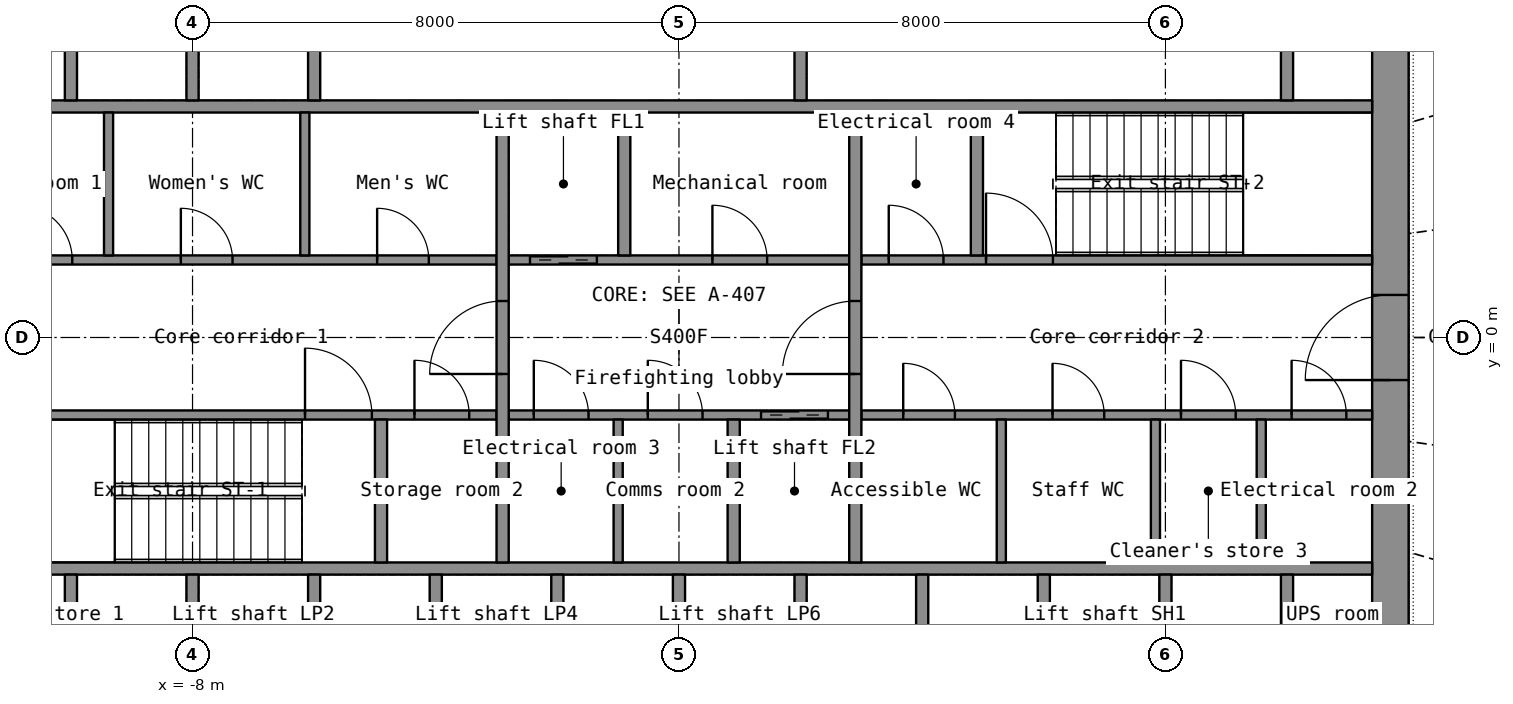
"""IFC4 building model, lengths in metres.
Left out: names, types, materials, properties, quantities, classifications, styles, units other than length and angle.
Written with IfcOpenShell. Run it as: python <this file> out.ifc"""

import sys

from ifc_helpers import new_model, si_unit, direction, frame, frame_2d, origin, place, context, subcontext, project, spatial, rectangle, extrude, element, fill, save


model = new_model("IFC4")
c1 = context("Model", 3, precision=1e-05, world=origin(), true_north=direction((0.0, 1.0)))
c2 = subcontext(c1, "Body", "Model", "MODEL_VIEW")
j1 = project(units=[si_unit("LENGTHUNIT", "METRE"), si_unit("PLANEANGLEUNIT", "RADIAN")], contexts=[c1])
p1 = place(None, origin())
s1 = spatial("IfcSite", under=j1, at=p1, CompositionType="ELEMENT")
p2 = place(p1, origin())
s2 = spatial("IfcBuilding", under=s1, at=p2, CompositionType="ELEMENT")
p3 = place(p2, frame((0.0, 0.0, 28.7)))
s3 = spatial("IfcBuildingStorey", under=s2, at=p3, CompositionType="ELEMENT", Elevation=28.7)
p4 = place(p3, frame((11.7, -7.2, 0.0), z_axis=(0.0, 0.0, 1.0), x_axis=(0.0, 1.0, 0.0)))
e1 = element("IfcWall", 1, at=p4, inside=s3, PredefinedType="SHEAR", context=c2, shape_type="SweptSolid", body=[
    extrude(rectangle(XDim=14.4, YDim=0.6, at=frame_2d((7.2, 0.0))), origin(), (0.0, 0.0, 1.0), 3.8),
])
p5 = place(p4, frame((6.5, 0.0, 0.0)))
e2 = element("IfcOpeningElement", 2, at=p5, cuts=e1, PredefinedType="OPENING", context=c2, shape_type="SweptSolid", body=[
    extrude(rectangle(XDim=1.4, YDim=2.2, at=frame_2d((0.7, 1.1))), frame((0.0, 0.31, 0.0), z_axis=(0.0, -1.0, 0.0), x_axis=(1.0, 0.0, 0.0)), (0.0, 0.0, 1.0), 0.62),
])
for number, where, z_axis, x_axis in (
    (3, (-11.4, -3.8, 0.0), (0.0, 0.0, 1.0), (1.0, 0.0, 0.0)),
    (4, (-11.4, 3.8, 0.0), (0.0, 0.0, 1.0), (1.0, 0.0, 0.0)),
):
    element("IfcWall", number, at=place(p3, frame(where, z_axis=z_axis, x_axis=x_axis)), inside=s3, PredefinedType="SHEAR", context=c2, shape_type="SweptSolid", body=[
        extrude(rectangle(XDim=22.8, YDim=0.2, at=frame_2d((11.4, 0.0))), origin(), (0.0, 0.0, 1.0), 3.8),
    ])
for number, where, z_axis, x_axis in (
    (5, (-10.0, -6.6, 0.0), (0.0, 0.0, 1.0), (0.0, 1.0, 0.0)),
    (6, (-8.0, -6.6, 0.0), (0.0, 0.0, 1.0), (0.0, 1.0, 0.0)),
    (7, (-6.0, -6.6, 0.0), (0.0, 0.0, 1.0), (0.0, 1.0, 0.0)),
    (8, (-4.0, -6.6, 0.0), (0.0, 0.0, 1.0), (0.0, 1.0, 0.0)),
    (9, (-2.0, -6.6, 0.0), (0.0, 0.0, 1.0), (0.0, 1.0, 0.0)),
    (10, (0.0, -6.6, 0.0), (0.0, 0.0, 1.0), (0.0, 1.0, 0.0)),
    (11, (2.0, -6.6, 0.0), (0.0, 0.0, 1.0), (0.0, 1.0, 0.0)),
    (12, (4.0, -6.6, 0.0), (0.0, 0.0, 1.0), (0.0, 1.0, 0.0)),
    (13, (6.0, -6.6, 0.0), (0.0, 0.0, 1.0), (0.0, 1.0, 0.0)),
    (14, (8.0, -6.6, 0.0), (0.0, 0.0, 1.0), (0.0, 1.0, 0.0)),
    (15, (10.0, -6.6, 0.0), (0.0, 0.0, 1.0), (0.0, 1.0, 0.0)),
    (16, (-10.0, 3.9, 0.0), (0.0, 0.0, 1.0), (0.0, 1.0, 0.0)),
    (17, (-8.0, 3.9, 0.0), (0.0, 0.0, 1.0), (0.0, 1.0, 0.0)),
    (18, (-6.0, 3.9, 0.0), (0.0, 0.0, 1.0), (0.0, 1.0, 0.0)),
    (19, (10.0, 3.9, 0.0), (0.0, 0.0, 1.0), (0.0, 1.0, 0.0)),
):
    element("IfcWall", number, at=place(p3, frame(where, z_axis=z_axis, x_axis=x_axis)), inside=s3, PredefinedType="SHEAR", context=c2, shape_type="SweptSolid", body=[
        extrude(rectangle(XDim=2.7, YDim=0.2, at=frame_2d((1.35, 0.0))), origin(), (0.0, 0.0, 1.0), 3.8),
    ])
p6 = place(p3, frame((2.0, 3.9, 0.0), z_axis=(0.0, 0.0, 1.0), x_axis=(0.0, 1.0, 0.0)))
e20 = element("IfcWall", 20, at=p6, inside=s3, PredefinedType="PARTITIONING", context=c2, shape_type="SweptSolid", body=[
    extrude(rectangle(XDim=2.7, YDim=0.2, at=frame_2d((1.35, 0.0))), origin(), (0.0, 0.0, 1.0), 3.8),
])
p7 = place(p3, frame((-11.4, -1.275, 0.0), z_axis=(0.0, 0.0, 1.0), x_axis=(1.0, 0.0, 0.0)))
e21 = element("IfcWall", 21, at=p7, inside=s3, PredefinedType="SHEAR", context=c2, shape_type="SweptSolid", body=[
    extrude(rectangle(XDim=8.4, YDim=0.15, at=frame_2d((4.2, 0.0))), origin(), (0.0, 0.0, 1.0), 3.8),
])
p8 = place(p7, frame((5.25, 0.0, 0.0)))
e22 = element("IfcOpeningElement", 22, at=p8, cuts=e21, PredefinedType="OPENING", context=c2, shape_type="SweptSolid", body=[
    extrude(rectangle(XDim=1.1, YDim=2.15, at=frame_2d((0.55, 1.075))), frame((0.0, 0.085, 0.0), z_axis=(0.0, -1.0, 0.0), x_axis=(1.0, 0.0, 0.0)), (0.0, 0.0, 1.0), 0.17),
])
p9 = place(p7, frame((7.05, 0.0, 0.0)))
e23 = element("IfcOpeningElement", 23, at=p9, cuts=e21, PredefinedType="OPENING", context=c2, shape_type="SweptSolid", body=[
    extrude(rectangle(XDim=0.9, YDim=2.1, at=frame_2d((0.45, 1.05))), frame((0.0, 0.085, 0.0), z_axis=(0.0, -1.0, 0.0), x_axis=(1.0, 0.0, 0.0)), (0.0, 0.0, 1.0), 0.17),
])
p10 = place(p3, frame((-2.8, -1.275, 0.0), z_axis=(0.0, 0.0, 1.0), x_axis=(1.0, 0.0, 0.0)))
e24 = element("IfcWall", 24, at=p10, inside=s3, PredefinedType="SHEAR", context=c2, shape_type="SweptSolid", body=[
    extrude(rectangle(XDim=5.6, YDim=0.15, at=frame_2d((2.8, 0.0))), origin(), (0.0, 0.0, 1.0), 3.8),
])
p11 = place(p10, frame((4.15, 0.0, 0.0)))
e25 = element("IfcOpeningElement", 25, at=p11, cuts=e24, PredefinedType="OPENING", context=c2, shape_type="SweptSolid", body=[
    extrude(rectangle(XDim=1.1, YDim=2.2, at=frame_2d((0.55, 1.1))), frame((0.0, 0.085, 0.0), z_axis=(0.0, -1.0, 0.0), x_axis=(1.0, 0.0, 0.0)), (0.0, 0.0, 1.0), 0.17),
])
p12 = place(p10, frame((0.413, 0.0, 0.0)))
e26 = element("IfcOpeningElement", 26, at=p12, cuts=e24, PredefinedType="OPENING", context=c2, shape_type="SweptSolid", body=[
    extrude(rectangle(XDim=0.9, YDim=2.1, at=frame_2d((0.45, 1.05))), frame((0.0, 0.085, 0.0), z_axis=(0.0, -1.0, 0.0), x_axis=(1.0, 0.0, 0.0)), (0.0, 0.0, 1.0), 0.17),
])
p13 = place(p10, frame((2.288, 0.0, 0.0)))
e27 = element("IfcOpeningElement", 27, at=p13, cuts=e24, PredefinedType="OPENING", context=c2, shape_type="SweptSolid", body=[
    extrude(rectangle(XDim=0.9, YDim=2.1, at=frame_2d((0.45, 1.05))), frame((0.0, 0.085, 0.0), z_axis=(0.0, -1.0, 0.0), x_axis=(1.0, 0.0, 0.0)), (0.0, 0.0, 1.0), 0.17),
])
p14 = place(p3, frame((3.0, -1.275, 0.0), z_axis=(0.0, 0.0, 1.0), x_axis=(1.0, 0.0, 0.0)))
e28 = element("IfcWall", 28, at=p14, inside=s3, PredefinedType="PARTITIONING", context=c2, shape_type="SweptSolid", body=[
    extrude(rectangle(XDim=8.4, YDim=0.15, at=frame_2d((4.2, 0.0))), origin(), (0.0, 0.0, 1.0), 3.8),
])
p15 = place(p14, frame((0.688, 0.0, 0.0)))
e29 = element("IfcOpeningElement", 29, at=p15, cuts=e28, PredefinedType="OPENING", context=c2, shape_type="SweptSolid", body=[
    extrude(rectangle(XDim=0.85, YDim=2.1, at=frame_2d((0.425, 1.05))), frame((0.0, 0.085, 0.0), z_axis=(0.0, -1.0, 0.0), x_axis=(1.0, 0.0, 0.0)), (0.0, 0.0, 1.0), 0.17),
])
p16 = place(p14, frame((3.144, 0.0, 0.0)))
e30 = element("IfcOpeningElement", 30, at=p16, cuts=e28, PredefinedType="OPENING", context=c2, shape_type="SweptSolid", body=[
    extrude(rectangle(XDim=0.85, YDim=2.1, at=frame_2d((0.425, 1.05))), frame((0.0, 0.085, 0.0), z_axis=(0.0, -1.0, 0.0), x_axis=(1.0, 0.0, 0.0)), (0.0, 0.0, 1.0), 0.17),
])
p17 = place(p14, frame((5.256, 0.0, 0.0)))
e31 = element("IfcOpeningElement", 31, at=p17, cuts=e28, PredefinedType="OPENING", context=c2, shape_type="SweptSolid", body=[
    extrude(rectangle(XDim=0.9, YDim=2.1, at=frame_2d((0.45, 1.05))), frame((0.0, 0.085, 0.0), z_axis=(0.0, -1.0, 0.0), x_axis=(1.0, 0.0, 0.0)), (0.0, 0.0, 1.0), 0.17),
])
p18 = place(p14, frame((7.075, 0.0, 0.0)))
e32 = element("IfcOpeningElement", 32, at=p18, cuts=e28, PredefinedType="OPENING", context=c2, shape_type="SweptSolid", body=[
    extrude(rectangle(XDim=0.9, YDim=2.1, at=frame_2d((0.45, 1.05))), frame((0.0, 0.085, 0.0), z_axis=(0.0, -1.0, 0.0), x_axis=(1.0, 0.0, 0.0)), (0.0, 0.0, 1.0), 0.17),
])
p19 = place(p3, frame((-11.4, 1.275, 0.0), z_axis=(0.0, 0.0, 1.0), x_axis=(1.0, 0.0, 0.0)))
e33 = element("IfcWall", 33, at=p19, inside=s3, PredefinedType="PARTITIONING", context=c2, shape_type="SweptSolid", body=[
    extrude(rectangle(XDim=8.4, YDim=0.15, at=frame_2d((4.2, 0.0))), origin(), (0.0, 0.0, 1.0), 3.8),
])
p20 = place(p19, frame((0.522, 0.0, 0.0)))
e34 = element("IfcOpeningElement", 34, at=p20, cuts=e33, PredefinedType="OPENING", context=c2, shape_type="SweptSolid", body=[
    extrude(rectangle(XDim=0.9, YDim=2.1, at=frame_2d((0.45, 1.05))), frame((0.0, 0.085, 0.0), z_axis=(0.0, -1.0, 0.0), x_axis=(1.0, 0.0, 0.0)), (0.0, 0.0, 1.0), 0.17),
])
p21 = place(p19, frame((3.208, 0.0, 0.0)))
e35 = element("IfcOpeningElement", 35, at=p21, cuts=e33, PredefinedType="OPENING", context=c2, shape_type="SweptSolid", body=[
    extrude(rectangle(XDim=0.85, YDim=2.1, at=frame_2d((0.425, 1.05))), frame((0.0, 0.085, 0.0), z_axis=(0.0, -1.0, 0.0), x_axis=(1.0, 0.0, 0.0)), (0.0, 0.0, 1.0), 0.17),
])
p22 = place(p19, frame((6.436, 0.0, 0.0)))
e36 = element("IfcOpeningElement", 36, at=p22, cuts=e33, PredefinedType="OPENING", context=c2, shape_type="SweptSolid", body=[
    extrude(rectangle(XDim=0.85, YDim=2.1, at=frame_2d((0.425, 1.05))), frame((0.0, 0.085, 0.0), z_axis=(0.0, -1.0, 0.0), x_axis=(1.0, 0.0, 0.0)), (0.0, 0.0, 1.0), 0.17),
])
p23 = place(p3, frame((-2.8, 1.275, 0.0), z_axis=(0.0, 0.0, 1.0), x_axis=(1.0, 0.0, 0.0)))
e37 = element("IfcWall", 37, at=p23, inside=s3, PredefinedType="SHEAR", context=c2, shape_type="SweptSolid", body=[
    extrude(rectangle(XDim=5.6, YDim=0.15, at=frame_2d((2.8, 0.0))), origin(), (0.0, 0.0, 1.0), 3.8),
])
p24 = place(p23, frame((0.35, 0.0, 0.0)))
e38 = element("IfcOpeningElement", 38, at=p24, cuts=e37, PredefinedType="OPENING", context=c2, shape_type="SweptSolid", body=[
    extrude(rectangle(XDim=1.1, YDim=2.2, at=frame_2d((0.55, 1.1))), frame((0.0, 0.085, 0.0), z_axis=(0.0, -1.0, 0.0), x_axis=(1.0, 0.0, 0.0)), (0.0, 0.0, 1.0), 0.17),
])
p25 = place(p23, frame((3.35, 0.0, 0.0)))
e39 = element("IfcOpeningElement", 39, at=p25, cuts=e37, PredefinedType="OPENING", context=c2, shape_type="SweptSolid", body=[
    extrude(rectangle(XDim=0.9, YDim=2.1, at=frame_2d((0.45, 1.05))), frame((0.0, 0.085, 0.0), z_axis=(0.0, -1.0, 0.0), x_axis=(1.0, 0.0, 0.0)), (0.0, 0.0, 1.0), 0.17),
])
p26 = place(p3, frame((3.0, 1.275, 0.0), z_axis=(0.0, 0.0, 1.0), x_axis=(1.0, 0.0, 0.0)))
e40 = element("IfcWall", 40, at=p26, inside=s3, PredefinedType="SHEAR", context=c2, shape_type="SweptSolid", body=[
    extrude(rectangle(XDim=8.4, YDim=0.15, at=frame_2d((4.2, 0.0))), origin(), (0.0, 0.0, 1.0), 3.8),
])
p27 = place(p26, frame((2.05, 0.0, 0.0)))
e41 = element("IfcOpeningElement", 41, at=p27, cuts=e40, PredefinedType="OPENING", context=c2, shape_type="SweptSolid", body=[
    extrude(rectangle(XDim=1.1, YDim=2.15, at=frame_2d((0.55, 1.075))), frame((0.0, 0.085, 0.0), z_axis=(0.0, -1.0, 0.0), x_axis=(1.0, 0.0, 0.0)), (0.0, 0.0, 1.0), 0.17),
])
p28 = place(p26, frame((0.45, 0.0, 0.0)))
e42 = element("IfcOpeningElement", 42, at=p28, cuts=e40, PredefinedType="OPENING", context=c2, shape_type="SweptSolid", body=[
    extrude(rectangle(XDim=0.9, YDim=2.1, at=frame_2d((0.45, 1.05))), frame((0.0, 0.085, 0.0), z_axis=(0.0, -1.0, 0.0), x_axis=(1.0, 0.0, 0.0)), (0.0, 0.0, 1.0), 0.17),
])
p29 = place(p3, frame((-2.9, -3.7, 0.0), z_axis=(0.0, 0.0, 1.0), x_axis=(0.0, 1.0, 0.0)))
e43 = element("IfcWall", 43, at=p29, inside=s3, PredefinedType="SHEAR", context=c2, shape_type="SweptSolid", body=[
    extrude(rectangle(XDim=7.4, YDim=0.2, at=frame_2d((3.7, 0.0))), origin(), (0.0, 0.0, 1.0), 3.8),
])
p30 = place(p29, frame((3.1, 0.0, 0.0)))
e44 = element("IfcOpeningElement", 44, at=p30, cuts=e43, PredefinedType="OPENING", context=c2, shape_type="SweptSolid", body=[
    extrude(rectangle(XDim=1.2, YDim=2.2, at=frame_2d((0.6, 1.1))), frame((0.0, 0.11, 0.0), z_axis=(0.0, -1.0, 0.0), x_axis=(1.0, 0.0, 0.0)), (0.0, 0.0, 1.0), 0.22),
])
p31 = place(p3, frame((2.9, -3.7, 0.0), z_axis=(0.0, 0.0, 1.0), x_axis=(0.0, 1.0, 0.0)))
e45 = element("IfcWall", 45, at=p31, inside=s3, PredefinedType="SHEAR", context=c2, shape_type="SweptSolid", body=[
    extrude(rectangle(XDim=7.4, YDim=0.2, at=frame_2d((3.7, 0.0))), origin(), (0.0, 0.0, 1.0), 3.8),
])
p32 = place(p31, frame((3.1, 0.0, 0.0)))
e46 = element("IfcOpeningElement", 46, at=p32, cuts=e45, PredefinedType="OPENING", context=c2, shape_type="SweptSolid", body=[
    extrude(rectangle(XDim=1.2, YDim=2.2, at=frame_2d((0.6, 1.1))), frame((0.0, 0.11, 0.0), z_axis=(0.0, -1.0, 0.0), x_axis=(1.0, 0.0, 0.0)), (0.0, 0.0, 1.0), 0.22),
])
for number, where, z_axis, x_axis in (
    (47, (-0.9, 1.35, 0.0), (0.0, 0.0, 1.0), (0.0, 1.0, 0.0)),
    (48, (0.9, -3.7, 0.0), (0.0, 0.0, 1.0), (0.0, 1.0, 0.0)),
    (49, (-4.9, -3.7, 0.0), (0.0, 0.0, 1.0), (0.0, 1.0, 0.0)),
    (50, (4.9, 1.35, 0.0), (0.0, 0.0, 1.0), (0.0, 1.0, 0.0)),
):
    element("IfcWall", number, at=place(p3, frame(where, z_axis=z_axis, x_axis=x_axis)), inside=s3, PredefinedType="SHEAR", context=c2, shape_type="SweptSolid", body=[
        extrude(rectangle(XDim=2.35, YDim=0.2, at=frame_2d((1.175, 0.0))), origin(), (0.0, 0.0, 1.0), 3.8),
    ])
for number, where, z_axis, x_axis in (
    (51, (-9.381, 1.35, 0.0), (0.0, 0.0, 1.0), (0.0, 1.0, 0.0)),
    (52, (-6.153, 1.35, 0.0), (0.0, 0.0, 1.0), (0.0, 1.0, 0.0)),
    (53, (5.301, -3.7, 0.0), (0.0, 0.0, 1.0), (0.0, 1.0, 0.0)),
    (54, (7.836, -3.7, 0.0), (0.0, 0.0, 1.0), (0.0, 1.0, 0.0)),
    (55, (9.576, -3.7, 0.0), (0.0, 0.0, 1.0), (0.0, 1.0, 0.0)),
    (56, (-1.0, -3.7, 0.0), (0.0, 0.0, 1.0), (0.0, 1.0, 0.0)),
):
    element("IfcWall", number, at=place(p3, frame(where, z_axis=z_axis, x_axis=x_axis)), inside=s3, PredefinedType="PARTITIONING", context=c2, shape_type="SweptSolid", body=[
        extrude(rectangle(XDim=2.35, YDim=0.15, at=frame_2d((1.175, 0.0))), origin(), (0.0, 0.0, 1.0), 3.8),
    ])
p33 = place(p5, origin())
e57 = element("IfcDoor", 57, at=p33, inside=s3, OperationType="DOUBLE_DOOR_SINGLE_SWING", PredefinedType="DOOR", context=c2, shape_type="SweptSolid", body=[
    extrude(rectangle(XDim=1.4, YDim=2.2, at=frame_2d((0.7, 1.1))), frame((0.0, 0.025, 0.0), z_axis=(0.0, -1.0, 0.0), x_axis=(1.0, 0.0, 0.0)), (0.0, 0.0, 1.0), 0.05),
])
fill(e2, e57)
p34 = place(p30, origin())
e58 = element("IfcDoor", 58, at=p34, inside=s3, OperationType="SINGLE_SWING_LEFT", PredefinedType="DOOR", context=c2, shape_type="SweptSolid", body=[
    extrude(rectangle(XDim=1.2, YDim=2.2, at=frame_2d((0.6, 1.1))), frame((0.0, 0.025, 0.0), z_axis=(0.0, -1.0, 0.0), x_axis=(1.0, 0.0, 0.0)), (0.0, 0.0, 1.0), 0.05),
])
fill(e44, e58)
p35 = place(p32, origin())
e59 = element("IfcDoor", 59, at=p35, inside=s3, OperationType="SINGLE_SWING_LEFT", PredefinedType="DOOR", context=c2, shape_type="SweptSolid", body=[
    extrude(rectangle(XDim=1.2, YDim=2.2, at=frame_2d((0.6, 1.1))), frame((0.0, 0.025, 0.0), z_axis=(0.0, -1.0, 0.0), x_axis=(1.0, 0.0, 0.0)), (0.0, 0.0, 1.0), 0.05),
])
fill(e46, e59)
p36 = place(p24, origin())
e60 = element("IfcDoor", 60, at=p36, inside=s3, OperationType="DOUBLE_DOOR_SLIDING", PredefinedType="DOOR", context=c2, shape_type="SweptSolid", body=[
    extrude(rectangle(XDim=1.1, YDim=2.2, at=frame_2d((0.55, 1.1))), frame((0.0, 0.025, 0.0), z_axis=(0.0, -1.0, 0.0), x_axis=(1.0, 0.0, 0.0)), (0.0, 0.0, 1.0), 0.05),
])
fill(e38, e60)
p37 = place(p11, origin())
e61 = element("IfcDoor", 61, at=p37, inside=s3, OperationType="DOUBLE_DOOR_SLIDING", PredefinedType="DOOR", context=c2, shape_type="SweptSolid", body=[
    extrude(rectangle(XDim=1.1, YDim=2.2, at=frame_2d((0.55, 1.1))), frame((0.0, 0.025, 0.0), z_axis=(0.0, -1.0, 0.0), x_axis=(1.0, 0.0, 0.0)), (0.0, 0.0, 1.0), 0.05),
])
fill(e25, e61)
p38 = place(p8, origin())
e62 = element("IfcDoor", 62, at=p38, inside=s3, OperationType="SINGLE_SWING_LEFT", PredefinedType="DOOR", context=c2, shape_type="SweptSolid", body=[
    extrude(rectangle(XDim=1.1, YDim=2.15, at=frame_2d((0.55, 1.075))), frame((0.0, 0.025, 0.0), z_axis=(0.0, -1.0, 0.0), x_axis=(1.0, 0.0, 0.0)), (0.0, 0.0, 1.0), 0.05),
])
fill(e22, e62)
p39 = place(p27, origin())
e63 = element("IfcDoor", 63, at=p39, inside=s3, OperationType="SINGLE_SWING_LEFT", PredefinedType="DOOR", context=c2, shape_type="SweptSolid", body=[
    extrude(rectangle(XDim=1.1, YDim=2.15, at=frame_2d((0.55, 1.075))), frame((0.0, 0.025, 0.0), z_axis=(0.0, -1.0, 0.0), x_axis=(1.0, 0.0, 0.0)), (0.0, 0.0, 1.0), 0.05),
])
fill(e41, e63)
p40 = place(p20, origin())
e64 = element("IfcDoor", 64, at=p40, inside=s3, OperationType="SINGLE_SWING_LEFT", PredefinedType="DOOR", context=c2, shape_type="SweptSolid", body=[
    extrude(rectangle(XDim=0.9, YDim=2.1, at=frame_2d((0.45, 1.05))), frame((0.0, 0.025, 0.0), z_axis=(0.0, -1.0, 0.0), x_axis=(1.0, 0.0, 0.0)), (0.0, 0.0, 1.0), 0.05),
])
fill(e34, e64)
p41 = place(p21, origin())
e65 = element("IfcDoor", 65, at=p41, inside=s3, OperationType="SINGLE_SWING_LEFT", PredefinedType="DOOR", context=c2, shape_type="SweptSolid", body=[
    extrude(rectangle(XDim=0.85, YDim=2.1, at=frame_2d((0.425, 1.05))), frame((0.0, 0.025, 0.0), z_axis=(0.0, -1.0, 0.0), x_axis=(1.0, 0.0, 0.0)), (0.0, 0.0, 1.0), 0.05),
])
fill(e35, e65)
p42 = place(p22, origin())
e66 = element("IfcDoor", 66, at=p42, inside=s3, OperationType="SINGLE_SWING_LEFT", PredefinedType="DOOR", context=c2, shape_type="SweptSolid", body=[
    extrude(rectangle(XDim=0.85, YDim=2.1, at=frame_2d((0.425, 1.05))), frame((0.0, 0.025, 0.0), z_axis=(0.0, -1.0, 0.0), x_axis=(1.0, 0.0, 0.0)), (0.0, 0.0, 1.0), 0.05),
])
fill(e36, e66)
p43 = place(p15, origin())
e67 = element("IfcDoor", 67, at=p43, inside=s3, OperationType="SINGLE_SWING_LEFT", PredefinedType="DOOR", context=c2, shape_type="SweptSolid", body=[
    extrude(rectangle(XDim=0.85, YDim=2.1, at=frame_2d((0.425, 1.05))), frame((0.0, 0.025, 0.0), z_axis=(0.0, -1.0, 0.0), x_axis=(1.0, 0.0, 0.0)), (0.0, 0.0, 1.0), 0.05),
])
fill(e29, e67)
p44 = place(p16, origin())
e68 = element("IfcDoor", 68, at=p44, inside=s3, OperationType="SINGLE_SWING_LEFT", PredefinedType="DOOR", context=c2, shape_type="SweptSolid", body=[
    extrude(rectangle(XDim=0.85, YDim=2.1, at=frame_2d((0.425, 1.05))), frame((0.0, 0.025, 0.0), z_axis=(0.0, -1.0, 0.0), x_axis=(1.0, 0.0, 0.0)), (0.0, 0.0, 1.0), 0.05),
])
fill(e30, e68)
p45 = place(p17, origin())
e69 = element("IfcDoor", 69, at=p45, inside=s3, OperationType="SINGLE_SWING_LEFT", PredefinedType="DOOR", context=c2, shape_type="SweptSolid", body=[
    extrude(rectangle(XDim=0.9, YDim=2.1, at=frame_2d((0.45, 1.05))), frame((0.0, 0.025, 0.0), z_axis=(0.0, -1.0, 0.0), x_axis=(1.0, 0.0, 0.0)), (0.0, 0.0, 1.0), 0.05),
])
fill(e31, e69)
p46 = place(p18, origin())
e70 = element("IfcDoor", 70, at=p46, inside=s3, OperationType="SINGLE_SWING_LEFT", PredefinedType="DOOR", context=c2, shape_type="SweptSolid", body=[
    extrude(rectangle(XDim=0.9, YDim=2.1, at=frame_2d((0.45, 1.05))), frame((0.0, 0.025, 0.0), z_axis=(0.0, -1.0, 0.0), x_axis=(1.0, 0.0, 0.0)), (0.0, 0.0, 1.0), 0.05),
])
fill(e32, e70)
p47 = place(p25, origin())
e71 = element("IfcDoor", 71, at=p47, inside=s3, OperationType="SINGLE_SWING_LEFT", PredefinedType="DOOR", context=c2, shape_type="SweptSolid", body=[
    extrude(rectangle(XDim=0.9, YDim=2.1, at=frame_2d((0.45, 1.05))), frame((0.0, 0.025, 0.0), z_axis=(0.0, -1.0, 0.0), x_axis=(1.0, 0.0, 0.0)), (0.0, 0.0, 1.0), 0.05),
])
fill(e39, e71)
p48 = place(p12, origin())
e72 = element("IfcDoor", 72, at=p48, inside=s3, OperationType="SINGLE_SWING_LEFT", PredefinedType="DOOR", context=c2, shape_type="SweptSolid", body=[
    extrude(rectangle(XDim=0.9, YDim=2.1, at=frame_2d((0.45, 1.05))), frame((0.0, 0.025, 0.0), z_axis=(0.0, -1.0, 0.0), x_axis=(1.0, 0.0, 0.0)), (0.0, 0.0, 1.0), 0.05),
])
fill(e26, e72)
p49 = place(p13, origin())
e73 = element("IfcDoor", 73, at=p49, inside=s3, OperationType="SINGLE_SWING_LEFT", PredefinedType="DOOR", context=c2, shape_type="SweptSolid", body=[
    extrude(rectangle(XDim=0.9, YDim=2.1, at=frame_2d((0.45, 1.05))), frame((0.0, 0.025, 0.0), z_axis=(0.0, -1.0, 0.0), x_axis=(1.0, 0.0, 0.0)), (0.0, 0.0, 1.0), 0.05),
])
fill(e27, e73)
p50 = place(p28, origin())
e74 = element("IfcDoor", 74, at=p50, inside=s3, OperationType="SINGLE_SWING_LEFT", PredefinedType="DOOR", context=c2, shape_type="SweptSolid", body=[
    extrude(rectangle(XDim=0.9, YDim=2.1, at=frame_2d((0.45, 1.05))), frame((0.0, 0.025, 0.0), z_axis=(0.0, -1.0, 0.0), x_axis=(1.0, 0.0, 0.0)), (0.0, 0.0, 1.0), 0.05),
])
fill(e42, e74)
p51 = place(p9, origin())
e75 = element("IfcDoor", 75, at=p51, inside=s3, OperationType="SINGLE_SWING_LEFT", PredefinedType="DOOR", context=c2, shape_type="SweptSolid", body=[
    extrude(rectangle(XDim=0.9, YDim=2.1, at=frame_2d((0.45, 1.05))), frame((0.0, 0.025, 0.0), z_axis=(0.0, -1.0, 0.0), x_axis=(1.0, 0.0, 0.0)), (0.0, 0.0, 1.0), 0.05),
])
fill(e23, e75)
save(model, sys.argv[1])
